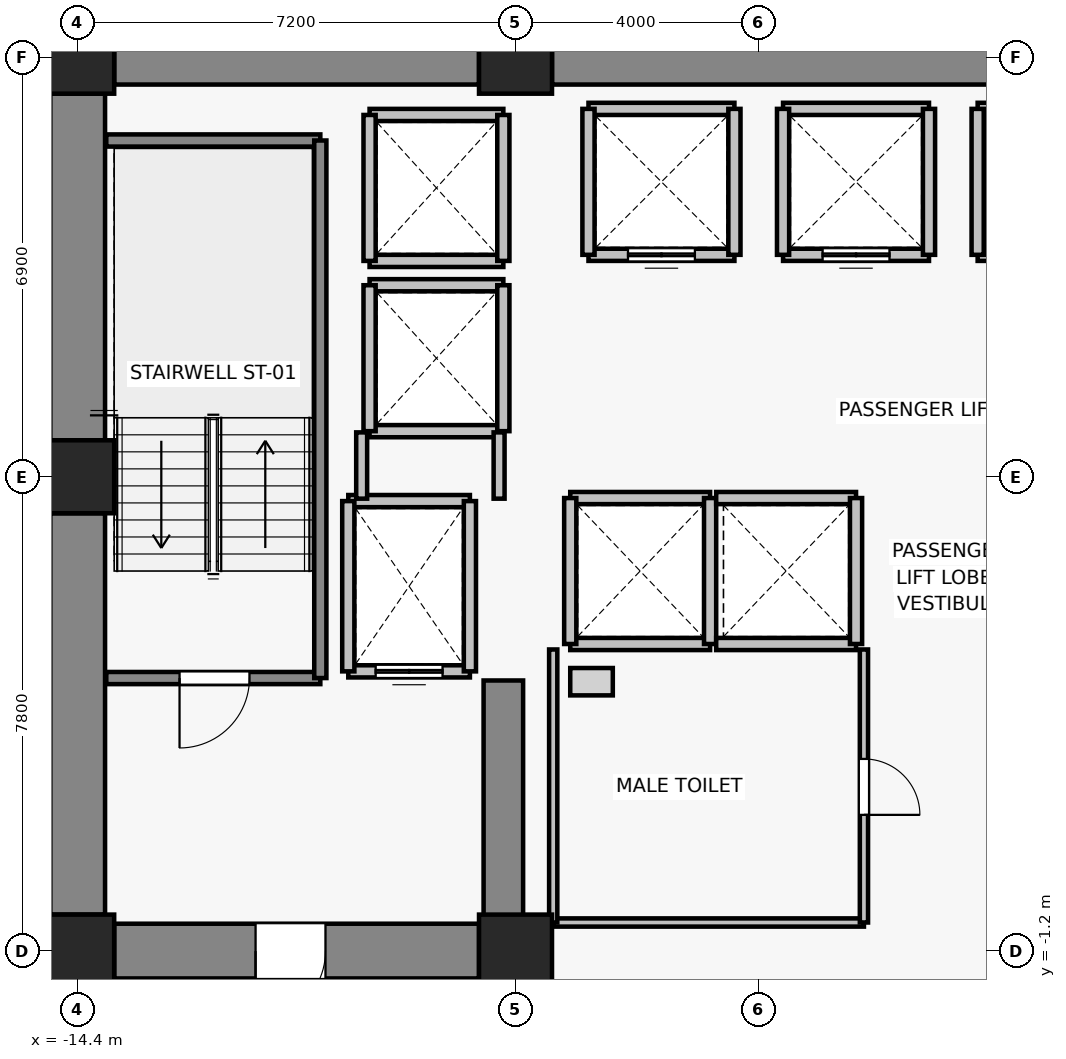
"""IFC4 building model, lengths in metres.
Left out: names, types, materials, properties, quantities, classifications, styles, units other than length and angle.
Written with IfcOpenShell. Run it as: python <this file> out.ifc"""

import sys

from ifc_helpers import new_model, si_unit, direction, frame, frame_2d, origin, origin_2d, place, context, subcontext, project, spatial, rectangle, extrude, source, transform, mapped, element, fill, save


model = new_model("IFC4")
c1 = context("Model", 3, precision=1e-05, world=origin(), true_north=direction((0.0, 1.0)))
c2 = subcontext(c1, "Body", "Model", "MODEL_VIEW")
j1 = project(units=[si_unit("LENGTHUNIT", "METRE"), si_unit("PLANEANGLEUNIT", "RADIAN")], contexts=[c1])
p1 = place(None, origin())
s1 = spatial("IfcSite", under=j1, at=p1, CompositionType="ELEMENT")
p2 = place(p1, origin())
s2 = spatial("IfcBuilding", under=s1, at=p2, CompositionType="ELEMENT")
p3 = place(p2, frame((0.0, 0.0, 76.9)))
s3 = spatial("IfcBuildingStorey", under=s2, at=p3, CompositionType="ELEMENT", Elevation=76.9)
for number, where, z_axis, x_axis in (
    (1, (-14.4, -1.2, 0.0), (0.0, 0.0, 1.0), (1.0, 0.0, 0.0)),
    (2, (-7.2, -1.2, 0.0), (0.0, 0.0, 1.0), (1.0, 0.0, 0.0)),
    (3, (-14.4, 6.6, 0.0), (0.0, 0.0, 1.0), (1.0, 0.0, 0.0)),
    (4, (-14.4, 13.5, 0.0), (0.0, 0.0, 1.0), (1.0, 0.0, 0.0)),
    (5, (-7.2, 13.5, 0.0), (0.0, 0.0, 1.0), (1.0, 0.0, 0.0)),
):
    element("IfcColumn", number, at=place(p3, frame(where, z_axis=z_axis, x_axis=x_axis)), inside=s3, PredefinedType="COLUMN", context=c2, shape_type="SweptSolid", body=[
        extrude(rectangle(XDim=1.2, YDim=1.2, at=origin_2d()), origin(), (0.0, 0.0, 1.0), 3.3),
    ])
p4 = place(p3, frame((-13.8, 13.5, 0.0), z_axis=(0.0, 0.0, 1.0), x_axis=(1.0, 0.0, 0.0)))
e6 = element("IfcWall", 6, at=p4, inside=s3, PredefinedType="SHEAR", context=c2, shape_type="SweptSolid", body=[
    extrude(rectangle(XDim=6.0, YDim=0.9, at=frame_2d((3.0, 0.0))), origin(), (0.0, 0.0, 1.0), 3.05),
])
p5 = place(p3, frame((-6.6, 13.5, 0.0), z_axis=(0.0, 0.0, 1.0), x_axis=(1.0, 0.0, 0.0)))
e7 = element("IfcWall", 7, at=p5, inside=s3, PredefinedType="SHEAR", context=c2, shape_type="SweptSolid", body=[
    extrude(rectangle(XDim=13.2, YDim=0.9, at=frame_2d((6.6, 0.0))), origin(), (0.0, 0.0, 1.0), 3.05),
])
p6 = place(p3, frame((-14.4, -0.6, 0.0), z_axis=(0.0, 0.0, 1.0), x_axis=(0.0, 1.0, 0.0)))
e8 = element("IfcWall", 8, at=p6, inside=s3, PredefinedType="SHEAR", context=c2, shape_type="SweptSolid", body=[
    extrude(rectangle(XDim=6.6, YDim=0.9, at=frame_2d((3.3, 0.0))), origin(), (0.0, 0.0, 1.0), 3.05),
])
p7 = place(p3, frame((-14.4, 7.2, 0.0), z_axis=(0.0, 0.0, 1.0), x_axis=(0.0, 1.0, 0.0)))
e9 = element("IfcWall", 9, at=p7, inside=s3, PredefinedType="SHEAR", context=c2, shape_type="SweptSolid", body=[
    extrude(rectangle(XDim=5.7, YDim=0.9, at=frame_2d((2.85, 0.0))), origin(), (0.0, 0.0, 1.0), 3.05),
])
p8 = place(p3, frame((-7.8, -1.2, 0.0), z_axis=(0.0, 0.0, 1.0), x_axis=(-1.0, 0.0, 0.0)))
e10 = element("IfcWall", 10, at=p8, inside=s3, PredefinedType="SHEAR", context=c2, shape_type="SweptSolid", body=[
    extrude(rectangle(XDim=6.0, YDim=0.9, at=frame_2d((3.0, 0.0))), origin(), (0.0, 0.0, 1.0), 3.05),
])
p9 = place(p8, frame((2.525, 0.0, 0.0)))
e11 = element("IfcOpeningElement", 11, at=p9, cuts=e10, PredefinedType="OPENING", context=c2, shape_type="SweptSolid", body=[
    extrude(rectangle(XDim=1.15, YDim=2.15, at=frame_2d((0.575, 1.075))), frame((0.0, 0.46, 0.0), z_axis=(0.0, -1.0, 0.0), x_axis=(1.0, 0.0, 0.0)), (0.0, 0.0, 1.0), 0.92),
])
p10 = place(p3, frame((-7.4, -0.75, 0.0), z_axis=(0.0, 0.0, 1.0), x_axis=(0.0, 1.0, 0.0)))
e12 = element("IfcWall", 12, at=p10, inside=s3, PredefinedType="SHEAR", context=c2, shape_type="SweptSolid", body=[
    extrude(rectangle(XDim=4.0, YDim=0.65, at=frame_2d((2.0, 0.0))), origin(), (0.0, 0.0, 1.0), 3.05),
])
p11 = place(p3, frame((-7.95, 3.4, 0.0), z_axis=(0.0, 0.0, 1.0), x_axis=(-1.0, 0.0, 0.0)))
e13 = element("IfcWall", 13, at=p11, inside=s3, PredefinedType="SOLIDWALL", context=c2, shape_type="SweptSolid", body=[
    extrude(rectangle(XDim=2.0, YDim=0.2, at=frame_2d((1.0, 0.0))), origin(), (0.0, 0.0, 1.0), 3.05),
])
p12 = place(p11, frame((0.45, 0.0, 0.0)))
e14 = element("IfcOpeningElement", 14, at=p12, cuts=e13, PredefinedType="OPENING", context=c2, shape_type="SweptSolid", body=[
    extrude(rectangle(XDim=1.1, YDim=2.2, at=frame_2d((0.55, 1.1))), frame((0.0, 0.11, 0.0), z_axis=(0.0, -1.0, 0.0), x_axis=(1.0, 0.0, 0.0)), (0.0, 0.0, 1.0), 0.22),
])
p13 = place(p3, frame((-9.95, 6.2, 0.0), z_axis=(0.0, 0.0, 1.0), x_axis=(1.0, 0.0, 0.0)))
e15 = element("IfcWall", 15, at=p13, inside=s3, PredefinedType="SOLIDWALL", context=c2, shape_type="SweptSolid", body=[
    extrude(rectangle(XDim=2.0, YDim=0.2, at=frame_2d((1.0, 0.0))), origin(), (0.0, 0.0, 1.0), 3.05),
])
for number, where, z_axis, x_axis in (
    (16, (-9.95, 3.4, 0.0), (0.0, 0.0, 1.0), (0.0, 1.0, 0.0)),
    (17, (-7.95, 6.2, 0.0), (0.0, 0.0, 1.0), (0.0, -1.0, 0.0)),
):
    element("IfcWall", number, at=place(p3, frame(where, z_axis=z_axis, x_axis=x_axis)), inside=s3, PredefinedType="SOLIDWALL", context=c2, shape_type="SweptSolid", body=[
        extrude(rectangle(XDim=2.8, YDim=0.2, at=frame_2d((1.4, 0.0))), origin(), (0.0, 0.0, 1.0), 3.05),
    ])
p14 = place(p3, frame((-3.6, 10.25, 0.0), z_axis=(0.0, 0.0, 1.0), x_axis=(-1.0, 0.0, 0.0)))
e18 = element("IfcWall", 18, at=p14, inside=s3, PredefinedType="SOLIDWALL", context=c2, shape_type="SweptSolid", body=[
    extrude(rectangle(XDim=2.4, YDim=0.2, at=frame_2d((1.2, 0.0))), origin(), (0.0, 0.0, 1.0), 3.05),
])
p15 = place(p14, frame((0.65, 0.0, 0.0)))
e19 = element("IfcOpeningElement", 19, at=p15, cuts=e18, PredefinedType="OPENING", context=c2, shape_type="SweptSolid", body=[
    extrude(rectangle(XDim=1.1, YDim=2.2, at=frame_2d((0.55, 1.1))), frame((0.0, 0.11, 0.0), z_axis=(0.0, -1.0, 0.0), x_axis=(1.0, 0.0, 0.0)), (0.0, 0.0, 1.0), 0.22),
])
for number, where, z_axis, x_axis in (
    (20, (-6.0, 12.65, 0.0), (0.0, 0.0, 1.0), (1.0, 0.0, 0.0)),
    (21, (-6.0, 10.25, 0.0), (0.0, 0.0, 1.0), (0.0, 1.0, 0.0)),
    (22, (-3.6, 12.65, 0.0), (0.0, 0.0, 1.0), (0.0, -1.0, 0.0)),
):
    element("IfcWall", number, at=place(p3, frame(where, z_axis=z_axis, x_axis=x_axis)), inside=s3, PredefinedType="SOLIDWALL", context=c2, shape_type="SweptSolid", body=[
        extrude(rectangle(XDim=2.4, YDim=0.2, at=frame_2d((1.2, 0.0))), origin(), (0.0, 0.0, 1.0), 3.05),
    ])
p16 = place(p3, frame((-0.4, 10.25, 0.0), z_axis=(0.0, 0.0, 1.0), x_axis=(-1.0, 0.0, 0.0)))
e23 = element("IfcWall", 23, at=p16, inside=s3, PredefinedType="SOLIDWALL", context=c2, shape_type="SweptSolid", body=[
    extrude(rectangle(XDim=2.4, YDim=0.2, at=frame_2d((1.2, 0.0))), origin(), (0.0, 0.0, 1.0), 3.05),
])
p17 = place(p16, frame((0.65, 0.0, 0.0)))
e24 = element("IfcOpeningElement", 24, at=p17, cuts=e23, PredefinedType="OPENING", context=c2, shape_type="SweptSolid", body=[
    extrude(rectangle(XDim=1.1, YDim=2.2, at=frame_2d((0.55, 1.1))), frame((0.0, 0.11, 0.0), z_axis=(0.0, -1.0, 0.0), x_axis=(1.0, 0.0, 0.0)), (0.0, 0.0, 1.0), 0.22),
])
p18 = place(p3, frame((-2.8, 12.65, 0.0), z_axis=(0.0, 0.0, 1.0), x_axis=(1.0, 0.0, 0.0)))
e25 = element("IfcWall", 25, at=p18, inside=s3, PredefinedType="SOLIDWALL", context=c2, shape_type="SweptSolid", body=[
    extrude(rectangle(XDim=2.4, YDim=0.2, at=frame_2d((1.2, 0.0))), origin(), (0.0, 0.0, 1.0), 3.05),
])
for number, where, z_axis, x_axis in (
    (26, (-2.8, 10.25, 0.0), (0.0, 0.0, 1.0), (0.0, 1.0, 0.0)),
    (27, (-0.4, 12.65, 0.0), (0.0, 0.0, 1.0), (0.0, -1.0, 0.0)),
):
    element("IfcWall", number, at=place(p3, frame(where, z_axis=z_axis, x_axis=x_axis)), inside=s3, PredefinedType="SOLIDWALL", context=c2, shape_type="SweptSolid", body=[
        extrude(rectangle(XDim=2.4, YDim=0.2, at=frame_2d((1.2, 0.0))), origin(), (0.0, 0.0, 1.0), 3.05),
    ])
p19 = place(p3, frame((2.8, 10.25, 0.0), z_axis=(0.0, 0.0, 1.0), x_axis=(-1.0, 0.0, 0.0)))
e28 = element("IfcWall", 28, at=p19, inside=s3, PredefinedType="SOLIDWALL", context=c2, shape_type="SweptSolid", body=[
    extrude(rectangle(XDim=2.4, YDim=0.2, at=frame_2d((1.2, 0.0))), origin(), (0.0, 0.0, 1.0), 3.05),
])
p20 = place(p19, frame((0.65, 0.0, 0.0)))
e29 = element("IfcOpeningElement", 29, at=p20, cuts=e28, PredefinedType="OPENING", context=c2, shape_type="SweptSolid", body=[
    extrude(rectangle(XDim=1.1, YDim=2.2, at=frame_2d((0.55, 1.1))), frame((0.0, 0.11, 0.0), z_axis=(0.0, -1.0, 0.0), x_axis=(1.0, 0.0, 0.0)), (0.0, 0.0, 1.0), 0.22),
])
p21 = place(p3, frame((0.4, 12.65, 0.0), z_axis=(0.0, 0.0, 1.0), x_axis=(1.0, 0.0, 0.0)))
e30 = element("IfcWall", 30, at=p21, inside=s3, PredefinedType="SOLIDWALL", context=c2, shape_type="SweptSolid", body=[
    extrude(rectangle(XDim=2.4, YDim=0.2, at=frame_2d((1.2, 0.0))), origin(), (0.0, 0.0, 1.0), 3.05),
])
p22 = place(p3, frame((0.4, 10.25, 0.0), z_axis=(0.0, 0.0, 1.0), x_axis=(0.0, 1.0, 0.0)))
e31 = element("IfcWall", 31, at=p22, inside=s3, PredefinedType="SOLIDWALL", context=c2, shape_type="SweptSolid", body=[
    extrude(rectangle(XDim=2.4, YDim=0.2, at=frame_2d((1.2, 0.0))), origin(), (0.0, 0.0, 1.0), 3.05),
])
for number, where, z_axis, x_axis in (
    (32, (-4.0, 3.85, 0.0), (0.0, 0.0, 1.0), (-1.0, 0.0, 0.0)),
    (33, (-6.3, 6.25, 0.0), (0.0, 0.0, 1.0), (1.0, 0.0, 0.0)),
):
    element("IfcWall", number, at=place(p3, frame(where, z_axis=z_axis, x_axis=x_axis)), inside=s3, PredefinedType="SOLIDWALL", context=c2, shape_type="SweptSolid", body=[
        extrude(rectangle(XDim=2.3, YDim=0.2, at=frame_2d((1.15, 0.0))), origin(), (0.0, 0.0, 1.0), 3.05),
    ])
for number, where, z_axis, x_axis in (
    (34, (-6.3, 3.85, 0.0), (0.0, 0.0, 1.0), (0.0, 1.0, 0.0)),
    (35, (-4.0, 6.25, 0.0), (0.0, 0.0, 1.0), (0.0, -1.0, 0.0)),
):
    element("IfcWall", number, at=place(p3, frame(where, z_axis=z_axis, x_axis=x_axis)), inside=s3, PredefinedType="SOLIDWALL", context=c2, shape_type="SweptSolid", body=[
        extrude(rectangle(XDim=2.4, YDim=0.2, at=frame_2d((1.2, 0.0))), origin(), (0.0, 0.0, 1.0), 3.05),
    ])
for number, where, z_axis, x_axis in (
    (36, (-1.6, 3.85, 0.0), (0.0, 0.0, 1.0), (-1.0, 0.0, 0.0)),
    (37, (-3.9, 6.25, 0.0), (0.0, 0.0, 1.0), (1.0, 0.0, 0.0)),
):
    element("IfcWall", number, at=place(p3, frame(where, z_axis=z_axis, x_axis=x_axis)), inside=s3, PredefinedType="SOLIDWALL", context=c2, shape_type="SweptSolid", body=[
        extrude(rectangle(XDim=2.3, YDim=0.2, at=frame_2d((1.15, 0.0))), origin(), (0.0, 0.0, 1.0), 3.05),
    ])
p23 = place(p3, frame((-1.6, 6.25, 0.0), z_axis=(0.0, 0.0, 1.0), x_axis=(0.0, -1.0, 0.0)))
e38 = element("IfcWall", 38, at=p23, inside=s3, PredefinedType="SOLIDWALL", context=c2, shape_type="SweptSolid", body=[
    extrude(rectangle(XDim=2.4, YDim=0.2, at=frame_2d((1.2, 0.0))), origin(), (0.0, 0.0, 1.0), 3.05),
])
for number, where, z_axis, x_axis in (
    (39, (-7.4, 7.35, 0.0), (0.0, 0.0, 1.0), (-1.0, 0.0, 0.0)),
    (40, (-9.6, 9.75, 0.0), (0.0, 0.0, 1.0), (1.0, 0.0, 0.0)),
):
    element("IfcWall", number, at=place(p3, frame(where, z_axis=z_axis, x_axis=x_axis)), inside=s3, PredefinedType="SOLIDWALL", context=c2, shape_type="SweptSolid", body=[
        extrude(rectangle(XDim=2.2, YDim=0.2, at=frame_2d((1.1, 0.0))), origin(), (0.0, 0.0, 1.0), 2.44),
    ])
p24 = place(p3, frame((-9.6, 7.35, 0.0), z_axis=(0.0, 0.0, 1.0), x_axis=(0.0, 1.0, 0.0)))
e41 = element("IfcWall", 41, at=p24, inside=s3, PredefinedType="SOLIDWALL", context=c2, shape_type="SweptSolid", body=[
    extrude(rectangle(XDim=2.4, YDim=0.2, at=frame_2d((1.2, 0.0))), origin(), (0.0, 0.0, 1.0), 3.05),
])
p25 = place(p3, frame((-7.4, 9.75, 0.0), z_axis=(0.0, 0.0, 1.0), x_axis=(0.0, -1.0, 0.0)))
e42 = element("IfcWall", 42, at=p25, inside=s3, PredefinedType="SOLIDWALL", context=c2, shape_type="SweptSolid", body=[
    extrude(rectangle(XDim=2.4, YDim=0.2, at=frame_2d((1.2, 0.0))), origin(), (0.0, 0.0, 1.0), 2.44),
])
for number, where, z_axis, x_axis in (
    (43, (-7.4, 10.15, 0.0), (0.0, 0.0, 1.0), (-1.0, 0.0, 0.0)),
    (44, (-9.6, 12.55, 0.0), (0.0, 0.0, 1.0), (1.0, 0.0, 0.0)),
):
    element("IfcWall", number, at=place(p3, frame(where, z_axis=z_axis, x_axis=x_axis)), inside=s3, PredefinedType="SOLIDWALL", context=c2, shape_type="SweptSolid", body=[
        extrude(rectangle(XDim=2.2, YDim=0.2, at=frame_2d((1.1, 0.0))), origin(), (0.0, 0.0, 1.0), 2.44),
    ])
p26 = place(p3, frame((-9.6, 10.15, 0.0), z_axis=(0.0, 0.0, 1.0), x_axis=(0.0, 1.0, 0.0)))
e45 = element("IfcWall", 45, at=p26, inside=s3, PredefinedType="SOLIDWALL", context=c2, shape_type="SweptSolid", body=[
    extrude(rectangle(XDim=2.4, YDim=0.2, at=frame_2d((1.2, 0.0))), origin(), (0.0, 0.0, 1.0), 3.05),
])
p27 = place(p3, frame((-7.4, 12.55, 0.0), z_axis=(0.0, 0.0, 1.0), x_axis=(0.0, -1.0, 0.0)))
e46 = element("IfcWall", 46, at=p27, inside=s3, PredefinedType="SOLIDWALL", context=c2, shape_type="SweptSolid", body=[
    extrude(rectangle(XDim=2.4, YDim=0.2, at=frame_2d((1.2, 0.0))), origin(), (0.0, 0.0, 1.0), 2.44),
])
p28 = place(p3, frame((-10.41, 3.29, 0.0), z_axis=(0.0, 0.0, 1.0), x_axis=(-1.0, 0.0, 0.0)))
e47 = element("IfcWall", 47, at=p28, inside=s3, PredefinedType="SOLIDWALL", context=c2, shape_type="SweptSolid", body=[
    extrude(rectangle(XDim=3.52, YDim=0.2, at=frame_2d((1.76, 0.0))), origin(), (0.0, 0.0, 1.0), 3.05),
])
p29 = place(p28, frame((1.165, 0.0, 0.0)))
e48 = element("IfcOpeningElement", 48, at=p29, cuts=e47, PredefinedType="OPENING", context=c2, shape_type="SweptSolid", body=[
    extrude(rectangle(XDim=1.15, YDim=2.15, at=frame_2d((0.575, 1.075))), frame((0.0, 0.11, 0.0), z_axis=(0.0, -1.0, 0.0), x_axis=(1.0, 0.0, 0.0)), (0.0, 0.0, 1.0), 0.22),
])
p30 = place(p3, frame((-13.93, 12.13, 0.0), z_axis=(0.0, 0.0, 1.0), x_axis=(1.0, 0.0, 0.0)))
e49 = element("IfcWall", 49, at=p30, inside=s3, PredefinedType="SOLIDWALL", context=c2, shape_type="SweptSolid", body=[
    extrude(rectangle(XDim=3.52, YDim=0.2, at=frame_2d((1.76, 0.0))), origin(), (0.0, 0.0, 1.0), 3.05),
])
p31 = place(p3, frame((-10.41, 12.13, 0.0), z_axis=(0.0, 0.0, 1.0), x_axis=(0.0, -1.0, 0.0)))
e50 = element("IfcWall", 50, at=p31, inside=s3, PredefinedType="SOLIDWALL", context=c2, shape_type="SweptSolid", body=[
    extrude(rectangle(XDim=8.84, YDim=0.2, at=frame_2d((4.42, 0.0))), origin(), (0.0, 0.0, 1.0), 3.05),
])
p32 = place(p3, frame((-9.73, 6.24, 0.0), z_axis=(0.0, 0.0, 1.0), x_axis=(0.0, 1.0, 0.0)))
e51 = element("IfcWall", 51, at=p32, inside=s3, PredefinedType="PARTITIONING", context=c2, shape_type="SweptSolid", body=[
    extrude(rectangle(XDim=1.09, YDim=0.18, at=frame_2d((0.545, 0.0))), origin(), (0.0, 0.0, 1.0), 3.05),
])
p33 = place(p3, frame((-7.47, 7.33, 0.0), z_axis=(0.0, 0.0, 1.0), x_axis=(0.0, -1.0, 0.0)))
e52 = element("IfcWall", 52, at=p33, inside=s3, PredefinedType="PARTITIONING", context=c2, shape_type="SweptSolid", body=[
    extrude(rectangle(XDim=1.09, YDim=0.18, at=frame_2d((0.545, 0.0))), origin(), (0.0, 0.0, 1.0), 2.44),
])
p34 = place(p3, frame((-1.47, -0.73, 0.0), z_axis=(0.0, 0.0, 1.0), x_axis=(-1.0, 0.0, 0.0)))
e53 = element("IfcWall", 53, at=p34, inside=s3, PredefinedType="PARTITIONING", context=c2, shape_type="SweptSolid", body=[
    extrude(rectangle(XDim=5.11, YDim=0.135, at=frame_2d((2.555, 0.0))), origin(), (0.0, 0.0, 1.0), 3.05),
])
p35 = place(p3, frame((-6.58, -0.73, 0.0), z_axis=(0.0, 0.0, 1.0), x_axis=(0.0, 1.0, 0.0)))
e54 = element("IfcWall", 54, at=p35, inside=s3, PredefinedType="PARTITIONING", context=c2, shape_type="SweptSolid", body=[
    extrude(rectangle(XDim=4.49, YDim=0.135, at=frame_2d((2.245, 0.0))), origin(), (0.0, 0.0, 1.0), 3.05),
])
p36 = place(p3, frame((-1.47, 3.76, 0.0), z_axis=(0.0, 0.0, 1.0), x_axis=(0.0, -1.0, 0.0)))
e55 = element("IfcWall", 55, at=p36, inside=s3, PredefinedType="PARTITIONING", context=c2, shape_type="SweptSolid", body=[
    extrude(rectangle(XDim=4.49, YDim=0.135, at=frame_2d((2.245, 0.0))), origin(), (0.0, 0.0, 1.0), 3.05),
])
p37 = place(p36, frame((1.8, 0.0, 0.0)))
e56 = element("IfcOpeningElement", 56, at=p37, cuts=e55, PredefinedType="OPENING", context=c2, shape_type="SweptSolid", body=[
    extrude(rectangle(XDim=0.92, YDim=2.1, at=frame_2d((0.46, 1.05))), frame((0.0, 0.077, 0.0), z_axis=(0.0, -1.0, 0.0), x_axis=(1.0, 0.0, 0.0)), (0.0, 0.0, 1.0), 0.155),
])
m1 = source(origin(), c2, "Body", "SweptSolid", [
    extrude(rectangle(XDim=1.1, YDim=2.2, at=frame_2d((0.55, 1.1))), frame((0.0, 0.025, 0.0), z_axis=(0.0, -1.0, 0.0), x_axis=(1.0, 0.0, 0.0)), (0.0, 0.0, 1.0), 0.05),
])
p38 = place(p12, origin())
e57 = element("IfcDoor", 57, at=p38, inside=s3, OperationType="DOUBLE_DOOR_SLIDING", PredefinedType="DOOR", context=c2, shape_type="MappedRepresentation", body=[
    mapped(m1, transform((0.0, 0.0, 0.0), x_axis=(1.0, 0.0, 0.0), y_axis=(0.0, 1.0, 0.0), z_axis=(0.0, 0.0, 1.0), scale=1.0)),
])
fill(e14, e57)
p39 = place(p15, origin())
e58 = element("IfcDoor", 58, at=p39, inside=s3, OperationType="DOUBLE_DOOR_SLIDING", PredefinedType="DOOR", context=c2, shape_type="MappedRepresentation", body=[
    mapped(m1, transform((0.0, 0.0, 0.0), x_axis=(1.0, 0.0, 0.0), y_axis=(0.0, 1.0, 0.0), z_axis=(0.0, 0.0, 1.0), scale=1.0)),
])
fill(e19, e58)
p40 = place(p17, origin())
e59 = element("IfcDoor", 59, at=p40, inside=s3, OperationType="DOUBLE_DOOR_SLIDING", PredefinedType="DOOR", context=c2, shape_type="MappedRepresentation", body=[
    mapped(m1, transform((0.0, 0.0, 0.0), x_axis=(1.0, 0.0, 0.0), y_axis=(0.0, 1.0, 0.0), z_axis=(0.0, 0.0, 1.0), scale=1.0)),
])
fill(e24, e59)
m2 = source(origin(), c2, "Body", "SweptSolid", [
    extrude(rectangle(XDim=1.15, YDim=2.15, at=frame_2d((0.575, 1.075))), frame((0.0, 0.025, 0.0), z_axis=(0.0, -1.0, 0.0), x_axis=(1.0, 0.0, 0.0)), (0.0, 0.0, 1.0), 0.05),
])
p41 = place(p29, origin())
e60 = element("IfcDoor", 60, at=p41, inside=s3, OperationType="SINGLE_SWING_RIGHT", PredefinedType="DOOR", context=c2, shape_type="MappedRepresentation", body=[
    mapped(m2, transform((0.0, 0.0, 0.0), x_axis=(1.0, 0.0, 0.0), y_axis=(0.0, 1.0, 0.0), z_axis=(0.0, 0.0, 1.0), scale=1.0)),
])
fill(e48, e60)
p42 = place(p9, origin())
e61 = element("IfcDoor", 61, at=p42, inside=s3, OperationType="SINGLE_SWING_RIGHT", PredefinedType="DOOR", context=c2, shape_type="MappedRepresentation", body=[
    mapped(m2, transform((0.0, 0.0, 0.0), x_axis=(1.0, 0.0, 0.0), y_axis=(0.0, 1.0, 0.0), z_axis=(0.0, 0.0, 1.0), scale=1.0)),
])
fill(e11, e61)
m3 = source(origin(), c2, "Body", "SweptSolid", [
    extrude(rectangle(XDim=0.92, YDim=2.1, at=frame_2d((0.46, 1.05))), frame((0.0, 0.025, 0.0), z_axis=(0.0, -1.0, 0.0), x_axis=(1.0, 0.0, 0.0)), (0.0, 0.0, 1.0), 0.05),
])
p43 = place(p37, origin())
e62 = element("IfcDoor", 62, at=p43, inside=s3, OperationType="SINGLE_SWING_RIGHT", PredefinedType="DOOR", context=c2, shape_type="MappedRepresentation", body=[
    mapped(m3, transform((0.0, 0.0, 0.0), x_axis=(1.0, 0.0, 0.0), y_axis=(0.0, 1.0, 0.0), z_axis=(0.0, 0.0, 1.0), scale=1.0)),
])
fill(e56, e62)
save(model, sys.argv[1])
